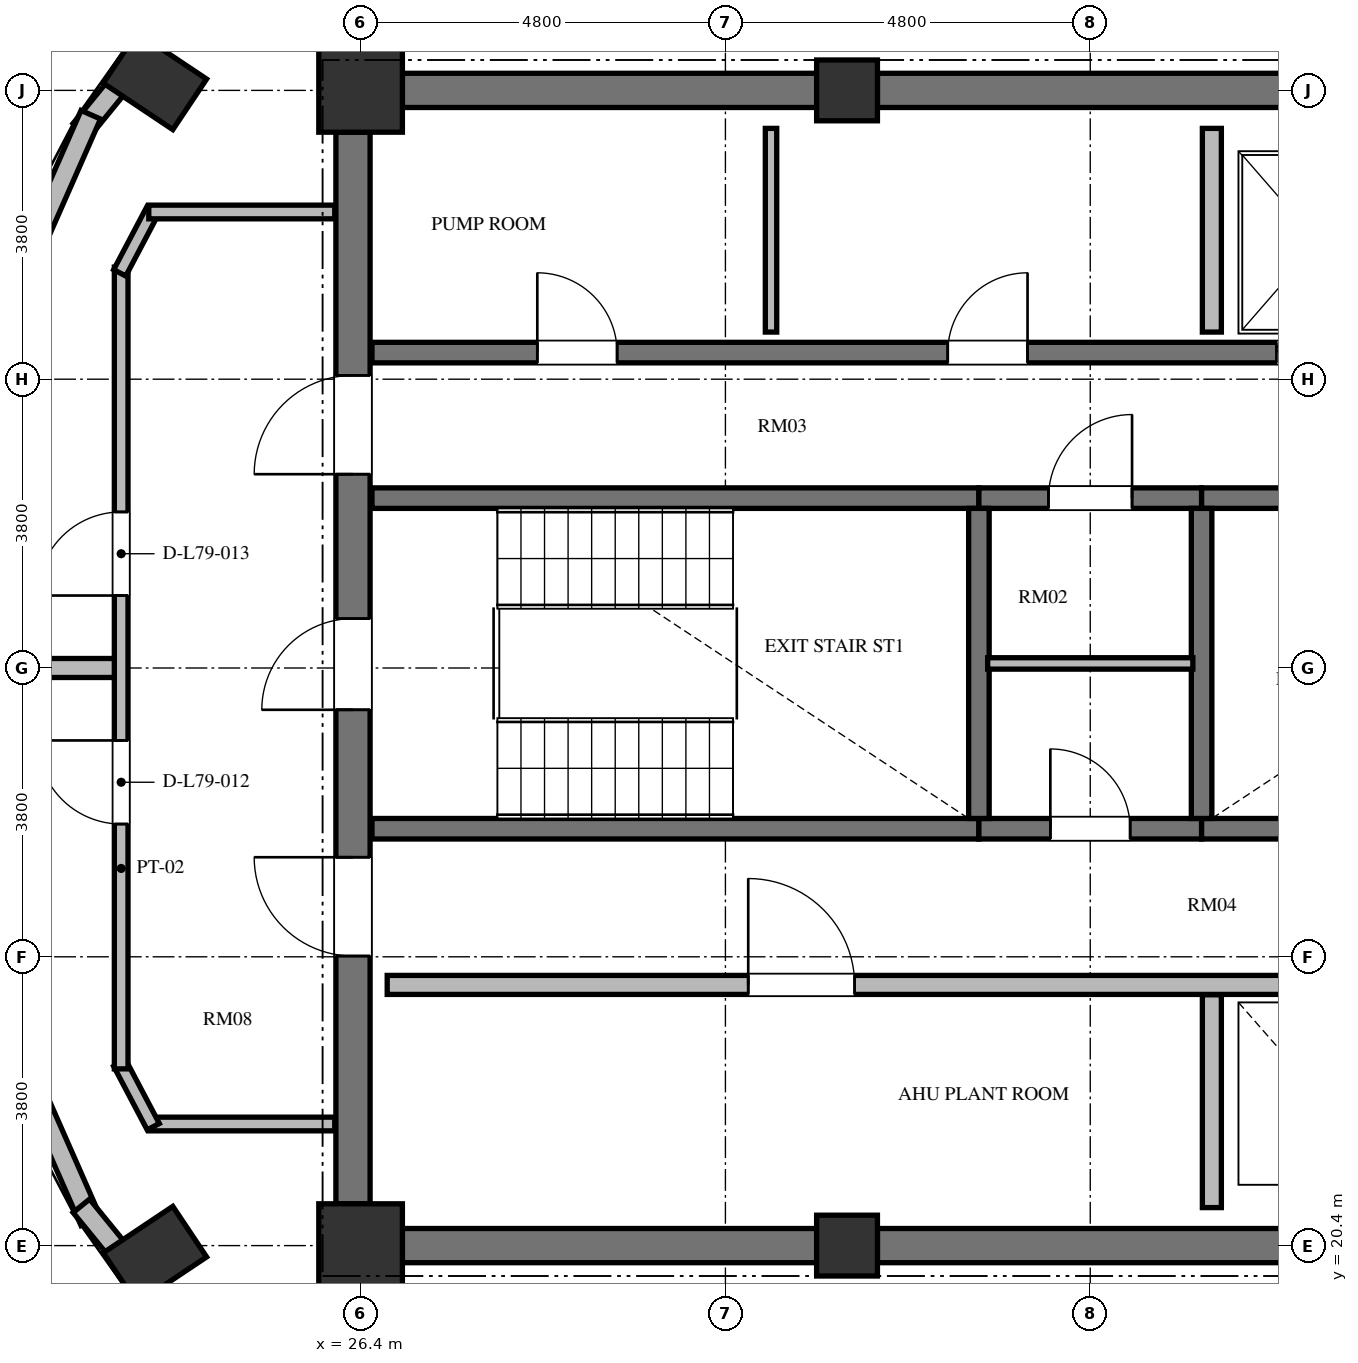
"""IFC4 building model, lengths in metres.
Left out: names, types, materials, properties, quantities, classifications, styles, units other than length and angle.
Written with IfcOpenShell. Run it as: python <this file> out.ifc"""

import sys

from ifc_helpers import new_model, si_unit, direction, frame, frame_2d, origin, origin_2d, place, context, subcontext, project, spatial, rectangle, extrude, element, fill, save


model = new_model("IFC4")
c1 = context("Model", 3, precision=1e-05, world=origin(), true_north=direction((0.0, 1.0)))
c2 = subcontext(c1, "Body", "Model", "MODEL_VIEW")
j1 = project(units=[si_unit("LENGTHUNIT", "METRE"), si_unit("PLANEANGLEUNIT", "RADIAN")], contexts=[c1])
p1 = place(None, origin())
s1 = spatial("IfcSite", under=j1, at=p1, CompositionType="ELEMENT")
p2 = place(p1, origin())
s2 = spatial("IfcBuilding", under=s1, at=p2, CompositionType="ELEMENT")
p3 = place(p2, frame((0.0, 0.0, 302.448)))
s3 = spatial("IfcBuildingStorey", under=s2, at=p3, CompositionType="ELEMENT", Elevation=302.448)
for number, where, z_axis, x_axis in (
    (1, (23.694, 35.722, 0.0), (0.0, 0.0, 1.0), (-0.831, 0.556, 0.0)),
    (2, (23.694, 20.278, 0.0), (0.0, 0.0, 1.0), (-0.831, -0.556, 0.0)),
):
    element("IfcColumn", number, at=place(p3, frame(where, z_axis=z_axis, x_axis=x_axis)), inside=s3, PredefinedType="COLUMN", context=c2, shape_type="SweptSolid", body=[
        extrude(rectangle(XDim=1.1, YDim=0.8, at=origin_2d()), origin(), (0.0, 0.0, 1.0), 3.388),
    ])
p4 = place(p3, frame((26.4, 20.4, 0.0), z_axis=(0.0, 0.0, 1.0), x_axis=(1.0, 0.0, 0.0)))
e3 = element("IfcColumn", 3, at=p4, inside=s3, PredefinedType="COLUMN", context=c2, shape_type="SweptSolid", body=[
    extrude(rectangle(XDim=1.1, YDim=1.1, at=origin_2d()), origin(), (0.0, 0.0, 1.0), 3.388),
])
for number, where, z_axis, x_axis in (
    (4, (32.8, 20.4, 0.0), (0.0, 0.0, 1.0), (1.0, 0.0, 0.0)),
    (5, (32.8, 35.6, 0.0), (0.0, 0.0, 1.0), (1.0, 0.0, 0.0)),
):
    element("IfcColumn", number, at=place(p3, frame(where, z_axis=z_axis, x_axis=x_axis)), inside=s3, PredefinedType="COLUMN", context=c2, shape_type="SweptSolid", body=[
        extrude(rectangle(XDim=0.8, YDim=0.8, at=origin_2d()), origin(), (0.0, 0.0, 1.0), 3.388),
    ])
p5 = place(p3, frame((26.4, 35.6, 0.0), z_axis=(0.0, 0.0, 1.0), x_axis=(1.0, 0.0, 0.0)))
e6 = element("IfcColumn", 6, at=p5, inside=s3, PredefinedType="COLUMN", context=c2, shape_type="SweptSolid", body=[
    extrude(rectangle(XDim=1.1, YDim=1.1, at=origin_2d()), origin(), (0.0, 0.0, 1.0), 3.388),
])
p6 = place(p3, frame((26.3, 20.95, 0.0), z_axis=(0.0, 0.0, 1.0), x_axis=(0.0, 1.0, 0.0)))
e7 = element("IfcWall", 7, at=p6, inside=s3, PredefinedType="SHEAR", context=c2, shape_type="SweptSolid", body=[
    extrude(rectangle(XDim=14.1, YDim=0.45, at=frame_2d((7.05, 0.0))), origin(), (0.0, 0.0, 1.0), 3.388),
])
p7 = place(p6, frame((6.5, 0.0, 0.0)))
e8 = element("IfcOpeningElement", 8, at=p7, cuts=e7, PredefinedType="OPENING", context=c2, shape_type="SweptSolid", body=[
    extrude(rectangle(XDim=1.2, YDim=2.15, at=frame_2d((0.6, 1.075))), frame((0.0, 0.235, 0.0), z_axis=(0.0, -1.0, 0.0), x_axis=(1.0, 0.0, 0.0)), (0.0, 0.0, 1.0), 0.47),
])
p8 = place(p6, frame((9.6, 0.0, 0.0)))
e9 = element("IfcOpeningElement", 9, at=p8, cuts=e7, PredefinedType="OPENING", context=c2, shape_type="SweptSolid", body=[
    extrude(rectangle(XDim=1.3, YDim=2.2, at=frame_2d((0.65, 1.1))), frame((0.0, 0.235, 0.0), z_axis=(0.0, -1.0, 0.0), x_axis=(1.0, 0.0, 0.0)), (0.0, 0.0, 1.0), 0.47),
])
p9 = place(p6, frame((3.26, 0.0, 0.0)))
e10 = element("IfcOpeningElement", 10, at=p9, cuts=e7, PredefinedType="OPENING", context=c2, shape_type="SweptSolid", body=[
    extrude(rectangle(XDim=1.3, YDim=2.2, at=frame_2d((0.65, 1.1))), frame((0.0, 0.235, 0.0), z_axis=(0.0, -1.0, 0.0), x_axis=(1.0, 0.0, 0.0)), (0.0, 0.0, 1.0), 0.47),
])
for number, where, z_axis, x_axis in (
    (11, (26.95, 20.4, 0.0), (0.0, 0.0, 1.0), (1.0, 0.0, 0.0)),
    (12, (26.95, 35.6, 0.0), (0.0, 0.0, 1.0), (1.0, 0.0, 0.0)),
):
    element("IfcWall", number, at=place(p3, frame(where, z_axis=z_axis, x_axis=x_axis)), inside=s3, PredefinedType="SHEAR", context=c2, shape_type="SweptSolid", body=[
        extrude(rectangle(XDim=5.45, YDim=0.45, at=frame_2d((2.725, 0.0))), origin(), (0.0, 0.0, 1.0), 3.388),
    ])
for number, where, z_axis, x_axis in (
    (13, (33.2, 20.4, 0.0), (0.0, 0.0, 1.0), (1.0, 0.0, 0.0)),
    (14, (33.2, 35.6, 0.0), (0.0, 0.0, 1.0), (1.0, 0.0, 0.0)),
):
    element("IfcWall", number, at=place(p3, frame(where, z_axis=z_axis, x_axis=x_axis)), inside=s3, PredefinedType="SHEAR", context=c2, shape_type="SweptSolid", body=[
        extrude(rectangle(XDim=5.6, YDim=0.45, at=frame_2d((2.8, 0.0))), origin(), (0.0, 0.0, 1.0), 3.388),
    ])
p10 = place(p3, frame((25.3, 38.233, 0.0), z_axis=(0.0, 0.0, 1.0), x_axis=(-0.631957150792, -0.775003328743, 0.0)))
e15 = element("IfcWall", 15, at=p10, inside=s3, PredefinedType="SOLIDWALL", context=c2, shape_type="SweptSolid", body=[
    extrude(rectangle(XDim=4.072, YDim=0.28, at=frame_2d((2.036, 0.0))), origin(), (0.0, 0.0, 1.0), 3.068),
])
for number, where, z_axis, x_axis in (
    (16, (22.85, 35.28, 0.0), (0.0, 0.0, 1.0), (-0.403, -0.915, 0.0)),
    (17, (21.231, 24.398, 0.0), (0.0, 0.0, 1.0), (0.403, -0.915, 0.0)),
):
    element("IfcWall", number, at=place(p3, frame(where, z_axis=z_axis, x_axis=x_axis)), inside=s3, PredefinedType="SOLIDWALL", context=c2, shape_type="SweptSolid", body=[
        extrude(rectangle(XDim=4.019, YDim=0.28, at=frame_2d((2.009, 0.0))), origin(), (0.0, 0.0, 1.0), 3.068),
    ])
p11 = place(p3, frame((22.726, 20.923, 0.0), z_axis=(0.0, 0.0, 1.0), x_axis=(0.631957150792, -0.775003328743, 0.0)))
e18 = element("IfcWall", 18, at=p11, inside=s3, PredefinedType="SOLIDWALL", context=c2, shape_type="SweptSolid", body=[
    extrude(rectangle(XDim=4.072, YDim=0.28, at=frame_2d((2.036, 0.0))), origin(), (0.0, 0.0, 1.0), 3.068),
])
p12 = place(p3, frame((26.55, 30.235, 0.0), z_axis=(0.0, 0.0, 1.0), x_axis=(1.0, 0.0, 0.0)))
e19 = element("IfcWall", 19, at=p12, inside=s3, PredefinedType="SHEAR", context=c2, shape_type="SweptSolid", body=[
    extrude(rectangle(XDim=7.985, YDim=0.27, at=frame_2d((3.992, 0.0))), origin(), (0.0, 0.0, 1.0), 3.388),
])
p13 = place(p3, frame((34.535, 30.235, 0.0), z_axis=(0.0, 0.0, 1.0), x_axis=(1.0, 0.0, 0.0)))
e20 = element("IfcWall", 20, at=p13, inside=s3, PredefinedType="SHEAR", context=c2, shape_type="SweptSolid", body=[
    extrude(rectangle(XDim=2.93, YDim=0.27, at=frame_2d((1.465, 0.0))), origin(), (0.0, 0.0, 1.0), 3.388),
])
p14 = place(p13, frame((0.915, 0.0, 0.0)))
e21 = element("IfcOpeningElement", 21, at=p14, cuts=e20, PredefinedType="OPENING", context=c2, shape_type="SweptSolid", body=[
    extrude(rectangle(XDim=1.1, YDim=2.15, at=frame_2d((0.55, 1.075))), frame((0.0, 0.145, 0.0), z_axis=(0.0, -1.0, 0.0), x_axis=(1.0, 0.0, 0.0)), (0.0, 0.0, 1.0), 0.29),
])
p15 = place(p3, frame((37.465, 30.235, 0.0), z_axis=(0.0, 0.0, 1.0), x_axis=(1.0, 0.0, 0.0)))
e22 = element("IfcWall", 22, at=p15, inside=s3, PredefinedType="SHEAR", context=c2, shape_type="SweptSolid", body=[
    extrude(rectangle(XDim=7.985, YDim=0.27, at=frame_2d((3.992, 0.0))), origin(), (0.0, 0.0, 1.0), 3.388),
])
p16 = place(p15, frame((6.455, 0.0, 0.0)))
e23 = element("IfcOpeningElement", 23, at=p16, cuts=e22, PredefinedType="OPENING", context=c2, shape_type="SweptSolid", body=[
    extrude(rectangle(XDim=1.2, YDim=2.15, at=frame_2d((0.6, 1.075))), frame((0.0, 0.145, 0.0), z_axis=(0.0, -1.0, 0.0), x_axis=(1.0, 0.0, 0.0)), (0.0, 0.0, 1.0), 0.29),
])
p17 = place(p3, frame((26.55, 25.885, 0.0), z_axis=(0.0, 0.0, 1.0), x_axis=(1.0, 0.0, 0.0)))
e24 = element("IfcWall", 24, at=p17, inside=s3, PredefinedType="SHEAR", context=c2, shape_type="SweptSolid", body=[
    extrude(rectangle(XDim=7.985, YDim=0.27, at=frame_2d((3.992, 0.0))), origin(), (0.0, 0.0, 1.0), 3.388),
])
p18 = place(p3, frame((34.535, 25.885, 0.0), z_axis=(0.0, 0.0, 1.0), x_axis=(1.0, 0.0, 0.0)))
e25 = element("IfcWall", 25, at=p18, inside=s3, PredefinedType="SHEAR", context=c2, shape_type="SweptSolid", body=[
    extrude(rectangle(XDim=2.93, YDim=0.27, at=frame_2d((1.465, 0.0))), origin(), (0.0, 0.0, 1.0), 3.388),
])
p19 = place(p18, frame((0.94, 0.0, 0.0)))
e26 = element("IfcOpeningElement", 26, at=p19, cuts=e25, PredefinedType="OPENING", context=c2, shape_type="SweptSolid", body=[
    extrude(rectangle(XDim=1.05, YDim=2.15, at=frame_2d((0.525, 1.075))), frame((0.0, 0.145, 0.0), z_axis=(0.0, -1.0, 0.0), x_axis=(1.0, 0.0, 0.0)), (0.0, 0.0, 1.0), 0.29),
])
p20 = place(p3, frame((37.465, 25.885, 0.0), z_axis=(0.0, 0.0, 1.0), x_axis=(1.0, 0.0, 0.0)))
e27 = element("IfcWall", 27, at=p20, inside=s3, PredefinedType="SHEAR", context=c2, shape_type="SweptSolid", body=[
    extrude(rectangle(XDim=7.985, YDim=0.27, at=frame_2d((3.992, 0.0))), origin(), (0.0, 0.0, 1.0), 3.388),
])
for number, where, z_axis, x_axis in (
    (28, (34.535, 26.02, 0.0), (0.0, 0.0, 1.0), (0.0, 1.0, 0.0)),
    (29, (37.465, 26.02, 0.0), (0.0, 0.0, 1.0), (0.0, 1.0, 0.0)),
):
    element("IfcWall", number, at=place(p3, frame(where, z_axis=z_axis, x_axis=x_axis)), inside=s3, PredefinedType="SHEAR", context=c2, shape_type="SweptSolid", body=[
        extrude(rectangle(XDim=4.08, YDim=0.27, at=frame_2d((2.04, 0.0))), origin(), (0.0, 0.0, 1.0), 3.388),
    ])
p21 = place(p3, frame((34.65, 28.06, 0.0), z_axis=(0.0, 0.0, 1.0), x_axis=(1.0, 0.0, 0.0)))
e30 = element("IfcWall", 30, at=p21, inside=s3, PredefinedType="PARTITIONING", context=c2, shape_type="SweptSolid", body=[
    extrude(rectangle(XDim=2.7, YDim=0.15, at=frame_2d((1.35, 0.0))), origin(), (0.0, 0.0, 1.0), 3.068),
])
p22 = place(p3, frame((26.55, 32.15, 0.0), z_axis=(0.0, 0.0, 1.0), x_axis=(1.0, 0.0, 0.0)))
e31 = element("IfcWall", 31, at=p22, inside=s3, PredefinedType="SHEAR", context=c2, shape_type="SweptSolid", body=[
    extrude(rectangle(XDim=16.4, YDim=0.27, at=frame_2d((8.2, 0.0))), origin(), (0.0, 0.0, 1.0), 3.388),
])
p23 = place(p22, frame((2.175, 0.0, 0.0)))
e32 = element("IfcOpeningElement", 32, at=p23, cuts=e31, PredefinedType="OPENING", context=c2, shape_type="SweptSolid", body=[
    extrude(rectangle(XDim=1.05, YDim=2.15, at=frame_2d((0.525, 1.075))), frame((0.0, 0.145, 0.0), z_axis=(0.0, -1.0, 0.0), x_axis=(1.0, 0.0, 0.0)), (0.0, 0.0, 1.0), 0.29),
])
p24 = place(p22, frame((7.575, 0.0, 0.0)))
e33 = element("IfcOpeningElement", 33, at=p24, cuts=e31, PredefinedType="OPENING", context=c2, shape_type="SweptSolid", body=[
    extrude(rectangle(XDim=1.05, YDim=2.15, at=frame_2d((0.525, 1.075))), frame((0.0, 0.145, 0.0), z_axis=(0.0, -1.0, 0.0), x_axis=(1.0, 0.0, 0.0)), (0.0, 0.0, 1.0), 0.29),
])
p25 = place(p22, frame((11.9, 0.0, 0.0)))
e34 = element("IfcOpeningElement", 34, at=p25, cuts=e31, PredefinedType="OPENING", context=c2, shape_type="SweptSolid", body=[
    extrude(rectangle(XDim=1.1, YDim=2.2, at=frame_2d((0.55, 1.1))), frame((0.0, 0.145, 0.0), z_axis=(0.0, -1.0, 0.0), x_axis=(1.0, 0.0, 0.0)), (0.0, 0.0, 1.0), 0.29),
])
p26 = place(p3, frame((26.75, 23.83, 0.0), z_axis=(0.0, 0.0, 1.0), x_axis=(1.0, 0.0, 0.0)))
e35 = element("IfcWall", 35, at=p26, inside=s3, PredefinedType="SOLIDWALL", context=c2, shape_type="SweptSolid", body=[
    extrude(rectangle(XDim=16.2, YDim=0.25, at=frame_2d((8.1, 0.0))), origin(), (0.0, 0.0, 1.0), 3.068),
])
p27 = place(p26, frame((4.75, 0.0, 0.0)))
e36 = element("IfcOpeningElement", 36, at=p27, cuts=e35, PredefinedType="OPENING", context=c2, shape_type="SweptSolid", body=[
    extrude(rectangle(XDim=1.4, YDim=2.2, at=frame_2d((0.7, 1.1))), frame((0.0, 0.135, 0.0), z_axis=(0.0, -1.0, 0.0), x_axis=(1.0, 0.0, 0.0)), (0.0, 0.0, 1.0), 0.27),
])
p28 = place(p3, frame((37.6, 32.42, 0.0), z_axis=(0.0, 0.0, 1.0), x_axis=(0.0, 1.0, 0.0)))
e37 = element("IfcWall", 37, at=p28, inside=s3, PredefinedType="SOLIDWALL", context=c2, shape_type="SweptSolid", body=[
    extrude(rectangle(XDim=2.68, YDim=0.25, at=frame_2d((1.34, 0.0))), origin(), (0.0, 0.0, 1.0), 3.068),
])
p29 = place(p3, frame((37.6, 20.9, 0.0), z_axis=(0.0, 0.0, 1.0), x_axis=(0.0, 1.0, 0.0)))
e38 = element("IfcWall", 38, at=p29, inside=s3, PredefinedType="SOLIDWALL", context=c2, shape_type="SweptSolid", body=[
    extrude(rectangle(XDim=2.8, YDim=0.25, at=frame_2d((1.4, 0.0))), origin(), (0.0, 0.0, 1.0), 3.068),
])
p30 = place(p3, frame((31.8, 32.42, 0.0), z_axis=(0.0, 0.0, 1.0), x_axis=(0.0, 1.0, 0.0)))
e39 = element("IfcWall", 39, at=p30, inside=s3, PredefinedType="PARTITIONING", context=c2, shape_type="SweptSolid", body=[
    extrude(rectangle(XDim=2.68, YDim=0.15, at=frame_2d((1.34, 0.0))), origin(), (0.0, 0.0, 1.0), 3.068),
])
p31 = place(p3, frame((26.06, 22.0, 0.0), z_axis=(0.0, 0.0, 1.0), x_axis=(-1.0, 0.0, 0.0)))
e40 = element("IfcWall", 40, at=p31, inside=s3, PredefinedType="PARTITIONING", context=c2, shape_type="SweptSolid", body=[
    extrude(rectangle(XDim=2.447, YDim=0.18, at=frame_2d((1.223, 0.0))), origin(), (0.0, 0.0, 1.0), 3.068),
])
p32 = place(p3, frame((23.672, 21.965, 0.0), z_axis=(0.0, 0.0, 1.0), x_axis=(-0.466427533163, 0.884559413667, 0.0)))
e41 = element("IfcWall", 41, at=p32, inside=s3, PredefinedType="PARTITIONING", context=c2, shape_type="SweptSolid", body=[
    extrude(rectangle(XDim=0.945, YDim=0.18, at=frame_2d((0.473, 0.0))), origin(), (0.0, 0.0, 1.0), 3.068),
])
p33 = place(p3, frame((23.25, 22.725, 0.0), z_axis=(0.0, 0.0, 1.0), x_axis=(0.0, 1.0, 0.0)))
e42 = element("IfcWall", 42, at=p33, inside=s3, PredefinedType="PARTITIONING", context=c2, shape_type="SweptSolid", body=[
    extrude(rectangle(XDim=10.549, YDim=0.18, at=frame_2d((5.275, 0.0))), origin(), (0.0, 0.0, 1.0), 3.068),
])
p34 = place(p33, frame((3.221, 0.0, 0.0)))
e43 = element("IfcOpeningElement", 43, at=p34, cuts=e42, PredefinedType="OPENING", context=c2, shape_type="SweptSolid", body=[
    extrude(rectangle(XDim=1.1, YDim=2.15, at=frame_2d((0.55, 1.075))), frame((0.0, 0.1, 0.0), z_axis=(0.0, -1.0, 0.0), x_axis=(1.0, 0.0, 0.0)), (0.0, 0.0, 1.0), 0.2),
])
p35 = place(p33, frame((6.228, 0.0, 0.0)))
e44 = element("IfcOpeningElement", 44, at=p35, cuts=e42, PredefinedType="OPENING", context=c2, shape_type="SweptSolid", body=[
    extrude(rectangle(XDim=1.1, YDim=2.15, at=frame_2d((0.55, 1.075))), frame((0.0, 0.1, 0.0), z_axis=(0.0, -1.0, 0.0), x_axis=(1.0, 0.0, 0.0)), (0.0, 0.0, 1.0), 0.2),
])
p36 = place(p3, frame((23.231, 33.199, 0.0), z_axis=(0.0, 0.0, 1.0), x_axis=(0.466427533163, 0.884559413667, 0.0)))
e45 = element("IfcWall", 45, at=p36, inside=s3, PredefinedType="PARTITIONING", context=c2, shape_type="SweptSolid", body=[
    extrude(rectangle(XDim=0.945, YDim=0.18, at=frame_2d((0.473, 0.0))), origin(), (0.0, 0.0, 1.0), 3.068),
])
p37 = place(p3, frame((23.614, 34.0, 0.0), z_axis=(0.0, 0.0, 1.0), x_axis=(1.0, 0.0, 0.0)))
e46 = element("IfcWall", 46, at=p37, inside=s3, PredefinedType="PARTITIONING", context=c2, shape_type="SweptSolid", body=[
    extrude(rectangle(XDim=2.447, YDim=0.18, at=frame_2d((1.223, 0.0))), origin(), (0.0, 0.0, 1.0), 3.068),
])
p38 = place(p3, frame((20.795, 28.0, 0.0), z_axis=(0.0, 0.0, 1.0), x_axis=(1.0, 0.0, 0.0)))
e47 = element("IfcWall", 47, at=p38, inside=s3, PredefinedType="SOLIDWALL", context=c2, shape_type="SweptSolid", body=[
    extrude(rectangle(XDim=2.365, YDim=0.25, at=frame_2d((1.183, 0.0))), origin(), (0.0, 0.0, 1.0), 3.068),
])
p39 = place(p7, origin())
e48 = element("IfcDoor", 48, at=p39, inside=s3, OperationType="SINGLE_SWING_LEFT", PredefinedType="DOOR", context=c2, shape_type="SweptSolid", body=[
    extrude(rectangle(XDim=1.2, YDim=2.15, at=frame_2d((0.6, 1.075))), frame((0.0, 0.025, 0.0), z_axis=(0.0, -1.0, 0.0), x_axis=(1.0, 0.0, 0.0)), (0.0, 0.0, 1.0), 0.05),
])
fill(e8, e48)
p40 = place(p19, origin())
e49 = element("IfcDoor", 49, at=p40, inside=s3, OperationType="SINGLE_SWING_LEFT", PredefinedType="DOOR", context=c2, shape_type="SweptSolid", body=[
    extrude(rectangle(XDim=1.05, YDim=2.15, at=frame_2d((0.525, 1.075))), frame((0.0, 0.025, 0.0), z_axis=(0.0, -1.0, 0.0), x_axis=(1.0, 0.0, 0.0)), (0.0, 0.0, 1.0), 0.05),
])
fill(e26, e49)
p41 = place(p14, origin())
e50 = element("IfcDoor", 50, at=p41, inside=s3, OperationType="SINGLE_SWING_RIGHT", PredefinedType="DOOR", context=c2, shape_type="SweptSolid", body=[
    extrude(rectangle(XDim=1.1, YDim=2.15, at=frame_2d((0.55, 1.075))), frame((0.0, 0.025, 0.0), z_axis=(0.0, -1.0, 0.0), x_axis=(1.0, 0.0, 0.0)), (0.0, 0.0, 1.0), 0.05),
])
fill(e21, e50)
p42 = place(p8, origin())
e51 = element("IfcDoor", 51, at=p42, inside=s3, OperationType="SINGLE_SWING_LEFT", PredefinedType="DOOR", context=c2, shape_type="SweptSolid", body=[
    extrude(rectangle(XDim=1.3, YDim=2.2, at=frame_2d((0.65, 1.1))), frame((0.0, 0.025, 0.0), z_axis=(0.0, -1.0, 0.0), x_axis=(1.0, 0.0, 0.0)), (0.0, 0.0, 1.0), 0.05),
])
fill(e9, e51)
p43 = place(p9, origin())
e52 = element("IfcDoor", 52, at=p43, inside=s3, OperationType="SINGLE_SWING_RIGHT", PredefinedType="DOOR", context=c2, shape_type="SweptSolid", body=[
    extrude(rectangle(XDim=1.3, YDim=2.2, at=frame_2d((0.65, 1.1))), frame((0.0, 0.025, 0.0), z_axis=(0.0, -1.0, 0.0), x_axis=(1.0, 0.0, 0.0)), (0.0, 0.0, 1.0), 0.05),
])
fill(e10, e52)
p44 = place(p23, origin())
e53 = element("IfcDoor", 53, at=p44, inside=s3, OperationType="SINGLE_SWING_LEFT", PredefinedType="DOOR", context=c2, shape_type="SweptSolid", body=[
    extrude(rectangle(XDim=1.05, YDim=2.15, at=frame_2d((0.525, 1.075))), frame((0.0, 0.025, 0.0), z_axis=(0.0, -1.0, 0.0), x_axis=(1.0, 0.0, 0.0)), (0.0, 0.0, 1.0), 0.05),
])
fill(e32, e53)
p45 = place(p24, origin())
e54 = element("IfcDoor", 54, at=p45, inside=s3, OperationType="SINGLE_SWING_RIGHT", PredefinedType="DOOR", context=c2, shape_type="SweptSolid", body=[
    extrude(rectangle(XDim=1.05, YDim=2.15, at=frame_2d((0.525, 1.075))), frame((0.0, 0.025, 0.0), z_axis=(0.0, -1.0, 0.0), x_axis=(1.0, 0.0, 0.0)), (0.0, 0.0, 1.0), 0.05),
])
fill(e33, e54)
p46 = place(p27, origin())
e55 = element("IfcDoor", 55, at=p46, inside=s3, OperationType="SINGLE_SWING_LEFT", PredefinedType="DOOR", context=c2, shape_type="SweptSolid", body=[
    extrude(rectangle(XDim=1.4, YDim=2.2, at=frame_2d((0.7, 1.1))), frame((0.0, 0.025, 0.0), z_axis=(0.0, -1.0, 0.0), x_axis=(1.0, 0.0, 0.0)), (0.0, 0.0, 1.0), 0.05),
])
fill(e36, e55)
p47 = place(p25, origin())
e56 = element("IfcDoor", 56, at=p47, inside=s3, OperationType="SLIDING_TO_LEFT", PredefinedType="DOOR", context=c2, shape_type="SweptSolid", body=[
    extrude(rectangle(XDim=1.1, YDim=2.2, at=frame_2d((0.55, 1.1))), frame((0.0, 0.025, 0.0), z_axis=(0.0, -1.0, 0.0), x_axis=(1.0, 0.0, 0.0)), (0.0, 0.0, 1.0), 0.05),
])
fill(e34, e56)
p48 = place(p34, origin())
e57 = element("IfcDoor", 57, at=p48, inside=s3, OperationType="SINGLE_SWING_RIGHT", PredefinedType="DOOR", context=c2, shape_type="SweptSolid", body=[
    extrude(rectangle(XDim=1.1, YDim=2.15, at=frame_2d((0.55, 1.075))), frame((0.0, 0.025, 0.0), z_axis=(0.0, -1.0, 0.0), x_axis=(1.0, 0.0, 0.0)), (0.0, 0.0, 1.0), 0.05),
])
fill(e43, e57)
p49 = place(p35, origin())
e58 = element("IfcDoor", 58, at=p49, inside=s3, OperationType="SINGLE_SWING_LEFT", PredefinedType="DOOR", context=c2, shape_type="SweptSolid", body=[
    extrude(rectangle(XDim=1.1, YDim=2.15, at=frame_2d((0.55, 1.075))), frame((0.0, 0.025, 0.0), z_axis=(0.0, -1.0, 0.0), x_axis=(1.0, 0.0, 0.0)), (0.0, 0.0, 1.0), 0.05),
])
fill(e44, e58)
save(model, sys.argv[1])
